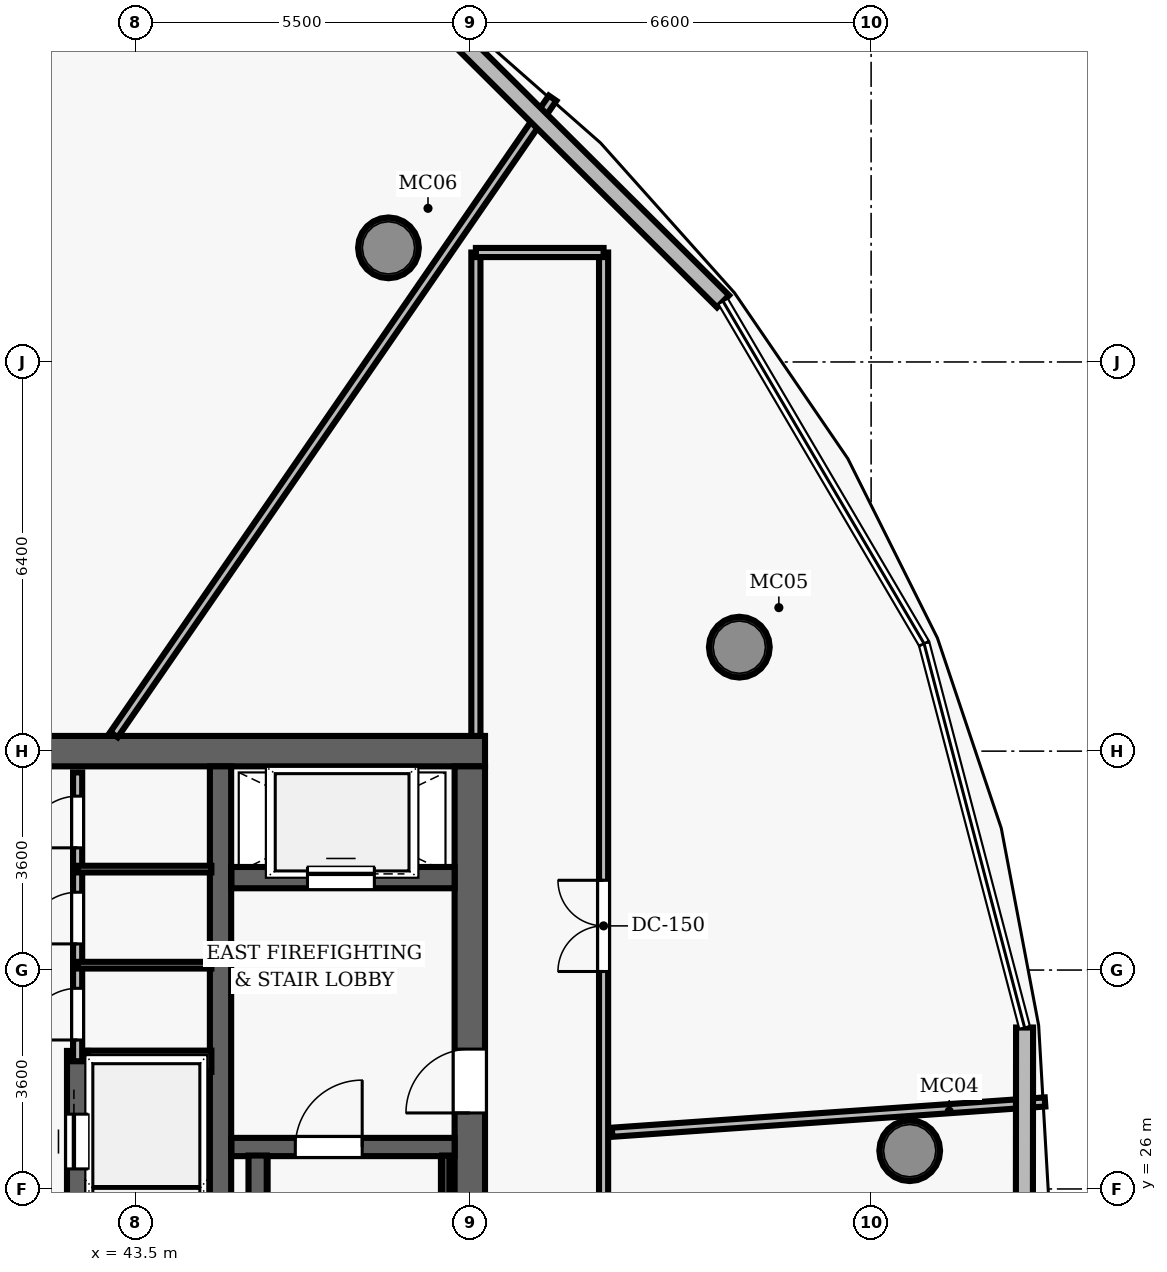
"""IFC4 building model, lengths in metres.
Left out: names, types, materials, properties, quantities, classifications, styles, units other than length and angle.
Written with IfcOpenShell. Run it as: python <this file> out.ifc"""

import sys

from ifc_helpers import new_model, si_unit, direction, frame, frame_2d, origin, origin_2d, place, context, subcontext, project, spatial, rectangle, hollow_circle, extrude, element, fill, save


model = new_model("IFC4")
c1 = context("Model", 3, precision=1e-05, world=origin(), true_north=direction((0.0, 1.0)))
c2 = subcontext(c1, "Body", "Model", "MODEL_VIEW")
j1 = project(units=[si_unit("LENGTHUNIT", "METRE"), si_unit("PLANEANGLEUNIT", "RADIAN")], contexts=[c1])
p1 = place(None, origin())
s1 = spatial("IfcSite", under=j1, at=p1, CompositionType="ELEMENT")
p2 = place(p1, origin())
s2 = spatial("IfcBuilding", under=s1, at=p2, CompositionType="ELEMENT")
p3 = place(p2, frame((0.0, 0.0, 303.65)))
s3 = spatial("IfcBuildingStorey", under=s2, at=p3, CompositionType="ELEMENT", Elevation=303.65)
p4 = place(p3, frame((26.75, 33.2, 0.0), z_axis=(0.0, 0.0, 1.0), x_axis=(1.0, 0.0, 0.0)))
e1 = element("IfcWall", 1, at=p4, inside=s3, PredefinedType="SHEAR", context=c2, shape_type="SweptSolid", body=[
    extrude(rectangle(XDim=22.5, YDim=0.5, at=frame_2d((11.25, 0.0))), origin(), (0.0, 0.0, 1.0), 3.85),
])
p5 = place(p3, frame((49.0, 19.05, 0.0), z_axis=(0.0, 0.0, 1.0), x_axis=(0.0, 1.0, 0.0)))
e2 = element("IfcWall", 2, at=p5, inside=s3, PredefinedType="SHEAR", context=c2, shape_type="SweptSolid", body=[
    extrude(rectangle(XDim=13.9, YDim=0.5, at=frame_2d((6.95, 0.0))), origin(), (0.0, 0.0, 1.0), 3.85),
])
p6 = place(p5, frame((8.2, 0.0, 0.0)))
e3 = element("IfcOpeningElement", 3, at=p6, cuts=e2, PredefinedType="OPENING", context=c2, shape_type="SweptSolid", body=[
    extrude(rectangle(XDim=1.05, YDim=2.15, at=frame_2d((0.525, 1.075))), frame((0.0, 0.26, 0.0), z_axis=(0.0, -1.0, 0.0), x_axis=(1.0, 0.0, 0.0)), (0.0, 0.0, 1.0), 0.52),
])
p7 = place(p3, frame((44.9, 19.05, 0.0), z_axis=(0.0, 0.0, 1.0), x_axis=(0.0, 1.0, 0.0)))
e4 = element("IfcWall", 4, at=p7, inside=s3, PredefinedType="SHEAR", context=c2, shape_type="SweptSolid", body=[
    extrude(rectangle(XDim=13.9, YDim=0.35, at=frame_2d((6.95, 0.0))), origin(), (0.0, 0.0, 1.0), 3.85),
])
for number, where, z_axis, x_axis in (
    (5, (56.235, 26.629, 0.0), (0.0, 0.0, 1.0), (1.0, 0.0, 0.0)),
    (6, (53.433, 34.91, 0.0), (0.0, 0.0, 1.0), (1.0, 0.0, 0.0)),
    (7, (47.662, 41.477, 0.0), (0.0, 0.0, 1.0), (1.0, 0.0, 0.0)),
):
    element("IfcColumn", number, at=place(p3, frame(where, z_axis=z_axis, x_axis=x_axis)), inside=s3, PredefinedType="COLUMN", context=c2, shape_type="SweptSolid", body=[
        extrude(hollow_circle(Radius=0.5, WallThickness=0.045, at=origin_2d()), origin(), (0.0, 0.0, 1.0), 3.85),
    ])
p8 = place(p3, frame((45.08, 26.69, 0.0), z_axis=(0.0, 0.0, 1.0), x_axis=(1.0, 0.0, 0.0)))
e8 = element("IfcWall", 8, at=p8, inside=s3, PredefinedType="SHEAR", context=c2, shape_type="SweptSolid", body=[
    extrude(rectangle(XDim=3.67, YDim=0.3, at=frame_2d((1.835, 0.0))), origin(), (0.0, 0.0, 1.0), 3.85),
])
p9 = place(p8, frame((1.05, 0.0, 0.0)))
e9 = element("IfcOpeningElement", 9, at=p9, cuts=e8, PredefinedType="OPENING", context=c2, shape_type="SweptSolid", body=[
    extrude(rectangle(XDim=1.1, YDim=2.15, at=frame_2d((0.55, 1.075))), frame((0.0, 0.16, 0.0), z_axis=(0.0, -1.0, 0.0), x_axis=(1.0, 0.0, 0.0)), (0.0, 0.0, 1.0), 0.32),
])
p10 = place(p3, frame((45.51, 19.05, 0.0), z_axis=(0.0, 0.0, 1.0), x_axis=(0.0, 1.0, 0.0)))
e10 = element("IfcWall", 10, at=p10, inside=s3, PredefinedType="SHEAR", context=c2, shape_type="SweptSolid", body=[
    extrude(rectangle(XDim=7.5, YDim=0.3, at=frame_2d((3.75, 0.0))), origin(), (0.0, 0.0, 1.0), 3.85),
])
p11 = place(p3, frame((48.605, 19.1, 0.0), z_axis=(0.0, 0.0, 1.0), x_axis=(0.0, 1.0, 0.0)))
e11 = element("IfcWall", 11, at=p11, inside=s3, PredefinedType="SHEAR", context=c2, shape_type="SweptSolid", body=[
    extrude(rectangle(XDim=7.45, YDim=0.12, at=frame_2d((3.725, 0.0))), origin(), (0.0, 0.0, 1.0), 3.85),
])
p12 = place(p3, frame((45.08, 31.12, 0.0), z_axis=(0.0, 0.0, 1.0), x_axis=(1.0, 0.0, 0.0)))
e12 = element("IfcWall", 12, at=p12, inside=s3, PredefinedType="SHEAR", context=c2, shape_type="SweptSolid", body=[
    extrude(rectangle(XDim=3.67, YDim=0.35, at=frame_2d((1.835, 0.0))), origin(), (0.0, 0.0, 1.0), 3.015),
])
p13 = place(p12, frame((1.25, 0.0, 0.0)))
e13 = element("IfcOpeningElement", 13, at=p13, cuts=e12, PredefinedType="OPENING", context=c2, shape_type="SweptSolid", body=[
    extrude(rectangle(XDim=1.1, YDim=2.15, at=frame_2d((0.55, 1.075))), frame((0.0, 0.185, 0.0), z_axis=(0.0, -1.0, 0.0), x_axis=(1.0, 0.0, 0.0)), (0.0, 0.0, 1.0), 0.37),
])
p14 = place(p3, frame((42.55, 21.73, 0.0), z_axis=(0.0, 0.0, 1.0), x_axis=(0.0, 1.0, 0.0)))
e14 = element("IfcWall", 14, at=p14, inside=s3, PredefinedType="SHEAR", context=c2, shape_type="SweptSolid", body=[
    extrude(rectangle(XDim=6.54, YDim=0.35, at=frame_2d((3.27, 0.0))), origin(), (0.0, 0.0, 1.0), 3.015),
])
p15 = place(p14, frame((0.5, 0.0, 0.0)))
e15 = element("IfcOpeningElement", 15, at=p15, cuts=e14, PredefinedType="OPENING", context=c2, shape_type="SweptSolid", body=[
    extrude(rectangle(XDim=0.9, YDim=2.15, at=frame_2d((0.45, 1.075))), frame((0.0, 0.185, 0.0), z_axis=(0.0, -1.0, 0.0), x_axis=(1.0, 0.0, 0.0)), (0.0, 0.0, 1.0), 0.37),
])
p16 = place(p14, frame((2.55, 0.0, 0.0)))
e16 = element("IfcOpeningElement", 16, at=p16, cuts=e14, PredefinedType="OPENING", context=c2, shape_type="SweptSolid", body=[
    extrude(rectangle(XDim=0.9, YDim=2.15, at=frame_2d((0.45, 1.075))), frame((0.0, 0.185, 0.0), z_axis=(0.0, -1.0, 0.0), x_axis=(1.0, 0.0, 0.0)), (0.0, 0.0, 1.0), 0.37),
])
p17 = place(p14, frame((4.6, 0.0, 0.0)))
e17 = element("IfcOpeningElement", 17, at=p17, cuts=e14, PredefinedType="OPENING", context=c2, shape_type="SweptSolid", body=[
    extrude(rectangle(XDim=0.9, YDim=2.15, at=frame_2d((0.45, 1.075))), frame((0.0, 0.185, 0.0), z_axis=(0.0, -1.0, 0.0), x_axis=(1.0, 0.0, 0.0)), (0.0, 0.0, 1.0), 0.37),
])
p18 = place(p3, frame((42.72, 28.1, 0.0), z_axis=(0.0, 0.0, 1.0), x_axis=(1.0, 0.0, 0.0)))
e18 = element("IfcWall", 18, at=p18, inside=s3, PredefinedType="SHEAR", context=c2, shape_type="SweptSolid", body=[
    extrude(rectangle(XDim=2.03, YDim=0.35, at=frame_2d((1.015, 0.0))), origin(), (0.0, 0.0, 1.0), 3.015),
])
p19 = place(p3, frame((42.55, 28.1, 0.0), z_axis=(0.0, 0.0, 1.0), x_axis=(0.0, 1.0, 0.0)))
e19 = element("IfcWall", 19, at=p19, inside=s3, PredefinedType="PARTITIONING", context=c2, shape_type="SweptSolid", body=[
    extrude(rectangle(XDim=4.75, YDim=0.15, at=frame_2d((2.375, 0.0))), origin(), (0.0, 0.0, 1.0), 3.015),
])
p20 = place(p19, frame((0.35, 0.0, 0.0)))
e20 = element("IfcOpeningElement", 20, at=p20, cuts=e19, PredefinedType="OPENING", context=c2, shape_type="SweptSolid", body=[
    extrude(rectangle(XDim=0.85, YDim=2.1, at=frame_2d((0.425, 1.05))), frame((0.0, 0.085, 0.0), z_axis=(0.0, -1.0, 0.0), x_axis=(1.0, 0.0, 0.0)), (0.0, 0.0, 1.0), 0.17),
])
p21 = place(p19, frame((1.93, 0.0, 0.0)))
e21 = element("IfcOpeningElement", 21, at=p21, cuts=e19, PredefinedType="OPENING", context=c2, shape_type="SweptSolid", body=[
    extrude(rectangle(XDim=0.85, YDim=2.1, at=frame_2d((0.425, 1.05))), frame((0.0, 0.085, 0.0), z_axis=(0.0, -1.0, 0.0), x_axis=(1.0, 0.0, 0.0)), (0.0, 0.0, 1.0), 0.17),
])
p22 = place(p19, frame((3.51, 0.0, 0.0)))
e22 = element("IfcOpeningElement", 22, at=p22, cuts=e19, PredefinedType="OPENING", context=c2, shape_type="SweptSolid", body=[
    extrude(rectangle(XDim=0.85, YDim=2.1, at=frame_2d((0.425, 1.05))), frame((0.0, 0.085, 0.0), z_axis=(0.0, -1.0, 0.0), x_axis=(1.0, 0.0, 0.0)), (0.0, 0.0, 1.0), 0.17),
])
for number, where, z_axis, x_axis in (
    (23, (42.55, 29.68, 0.0), (0.0, 0.0, 1.0), (1.0, 0.0, 0.0)),
    (24, (42.55, 31.26, 0.0), (0.0, 0.0, 1.0), (1.0, 0.0, 0.0)),
):
    element("IfcWall", number, at=place(p3, frame(where, z_axis=z_axis, x_axis=x_axis)), inside=s3, PredefinedType="PARTITIONING", context=c2, shape_type="SweptSolid", body=[
        extrude(rectangle(XDim=2.2, YDim=0.11, at=frame_2d((1.1, 0.0))), origin(), (0.0, 0.0, 1.0), 3.015),
    ])
p23 = place(p3, frame((51.2, 10.6, 0.0), z_axis=(0.0, 0.0, 1.0), x_axis=(0.0, 1.0, 0.0)))
e25 = element("IfcWall", 25, at=p23, inside=s3, PredefinedType="PARTITIONING", context=c2, shape_type="SweptSolid", body=[
    extrude(rectangle(XDim=30.8, YDim=0.15, at=frame_2d((15.4, 0.0))), origin(), (0.0, 0.0, 1.0), 3.015),
])
p24 = place(p23, frame((18.976, 0.0, 0.0)))
e26 = element("IfcOpeningElement", 26, at=p24, cuts=e25, PredefinedType="OPENING", context=c2, shape_type="SweptSolid", body=[
    extrude(rectangle(XDim=1.5, YDim=2.2, at=frame_2d((0.75, 1.1))), frame((0.0, 0.085, 0.0), z_axis=(0.0, -1.0, 0.0), x_axis=(1.0, 0.0, 0.0)), (0.0, 0.0, 1.0), 0.17),
])
p25 = place(p23, frame((12.135, 0.0, 0.0)))
e27 = element("IfcOpeningElement", 27, at=p25, cuts=e25, PredefinedType="OPENING", context=c2, shape_type="SweptSolid", body=[
    extrude(rectangle(XDim=0.95, YDim=2.15, at=frame_2d((0.475, 1.075))), frame((0.0, 0.085, 0.0), z_axis=(0.0, -1.0, 0.0), x_axis=(1.0, 0.0, 0.0)), (0.0, 0.0, 1.0), 0.17),
])
p26 = place(p3, frame((49.1, 33.45, 0.0), z_axis=(0.0, 0.0, 1.0), x_axis=(0.0, 1.0, 0.0)))
e28 = element("IfcWall", 28, at=p26, inside=s3, PredefinedType="PARTITIONING", context=c2, shape_type="SweptSolid", body=[
    extrude(rectangle(XDim=7.95, YDim=0.15, at=frame_2d((3.975, 0.0))), origin(), (0.0, 0.0, 1.0), 3.015),
])
p27 = place(p3, frame((49.1, 41.4, 0.0), z_axis=(0.0, 0.0, 1.0), x_axis=(1.0, 0.0, 0.0)))
e29 = element("IfcWall", 29, at=p27, inside=s3, PredefinedType="PARTITIONING", context=c2, shape_type="SweptSolid", body=[
    extrude(rectangle(XDim=2.1, YDim=0.15, at=frame_2d((1.05, 0.0))), origin(), (0.0, 0.0, 1.0), 3.015),
])
p28 = place(p3, frame((51.34, 26.933, 0.0), z_axis=(0.0, 0.0, 1.0), x_axis=(0.997564872664, 0.069744711815, 0.0)))
e30 = element("IfcWall", 30, at=p28, inside=s3, PredefinedType="PARTITIONING", context=c2, shape_type="SweptSolid", body=[
    extrude(rectangle(XDim=7.137, YDim=0.15, at=frame_2d((3.569, 0.0))), origin(), (0.0, 0.0, 1.0), 3.015),
])
p29 = place(p3, frame((43.148, 33.47, 0.0), z_axis=(0.0, 0.0, 1.0), x_axis=(0.567425051225, 0.823425048952, 0.0)))
e31 = element("IfcWall", 31, at=p29, inside=s3, PredefinedType="PARTITIONING", context=c2, shape_type="SweptSolid", body=[
    extrude(rectangle(XDim=12.712, YDim=0.15, at=frame_2d((6.356, 0.0))), origin(), (0.0, 0.0, 1.0), 3.015),
])
p30 = place(p3, frame((58.124, 28.655, 0.0), z_axis=(0.0, 0.0, 1.0), x_axis=(-0.001010062707, -0.999999489887, 0.0)))
e32 = element("IfcWall", 32, at=p30, inside=s3, PredefinedType="SOLIDWALL", context=c2, shape_type="SweptSolid", body=[
    extrude(rectangle(XDim=6.526, YDim=0.28, at=frame_2d((3.263, 0.0))), origin(), (0.0, 0.0, 1.0), 3.6),
])
p31 = place(p3, frame((48.538, 45.199, 0.0), z_axis=(0.0, 0.0, 1.0), x_axis=(0.709049371212, -0.705158839683, 0.0)))
e33 = element("IfcWall", 33, at=p31, inside=s3, PredefinedType="SOLIDWALL", context=c2, shape_type="SweptSolid", body=[
    extrude(rectangle(XDim=6.526, YDim=0.28, at=frame_2d((3.263, 0.0))), origin(), (0.0, 0.0, 1.0), 3.6),
])
p32 = place(p9, origin())
e34 = element("IfcDoor", 34, at=p32, inside=s3, OperationType="SINGLE_SWING_RIGHT", PredefinedType="DOOR", context=c2, shape_type="SweptSolid", body=[
    extrude(rectangle(XDim=1.1, YDim=2.15, at=frame_2d((0.55, 1.075))), frame((0.0, 0.025, 0.0), z_axis=(0.0, -1.0, 0.0), x_axis=(1.0, 0.0, 0.0)), (0.0, 0.0, 1.0), 0.05),
])
fill(e9, e34)
p33 = place(p6, origin())
e35 = element("IfcDoor", 35, at=p33, inside=s3, OperationType="SINGLE_SWING_LEFT", PredefinedType="DOOR", context=c2, shape_type="SweptSolid", body=[
    extrude(rectangle(XDim=1.05, YDim=2.15, at=frame_2d((0.525, 1.075))), frame((0.0, 0.025, 0.0), z_axis=(0.0, -1.0, 0.0), x_axis=(1.0, 0.0, 0.0)), (0.0, 0.0, 1.0), 0.05),
])
fill(e3, e35)
p34 = place(p20, origin())
e36 = element("IfcDoor", 36, at=p34, inside=s3, OperationType="SINGLE_SWING_LEFT", PredefinedType="DOOR", context=c2, shape_type="SweptSolid", body=[
    extrude(rectangle(XDim=0.85, YDim=2.1, at=frame_2d((0.425, 1.05))), frame((0.0, 0.025, 0.0), z_axis=(0.0, -1.0, 0.0), x_axis=(1.0, 0.0, 0.0)), (0.0, 0.0, 1.0), 0.05),
])
fill(e20, e36)
p35 = place(p21, origin())
e37 = element("IfcDoor", 37, at=p35, inside=s3, OperationType="SINGLE_SWING_LEFT", PredefinedType="DOOR", context=c2, shape_type="SweptSolid", body=[
    extrude(rectangle(XDim=0.85, YDim=2.1, at=frame_2d((0.425, 1.05))), frame((0.0, 0.025, 0.0), z_axis=(0.0, -1.0, 0.0), x_axis=(1.0, 0.0, 0.0)), (0.0, 0.0, 1.0), 0.05),
])
fill(e21, e37)
p36 = place(p22, origin())
e38 = element("IfcDoor", 38, at=p36, inside=s3, OperationType="SINGLE_SWING_LEFT", PredefinedType="DOOR", context=c2, shape_type="SweptSolid", body=[
    extrude(rectangle(XDim=0.85, YDim=2.1, at=frame_2d((0.425, 1.05))), frame((0.0, 0.025, 0.0), z_axis=(0.0, -1.0, 0.0), x_axis=(1.0, 0.0, 0.0)), (0.0, 0.0, 1.0), 0.05),
])
fill(e22, e38)
p37 = place(p24, origin())
e39 = element("IfcDoor", 39, at=p37, inside=s3, OperationType="DOUBLE_DOOR_SINGLE_SWING", PredefinedType="DOOR", context=c2, shape_type="SweptSolid", body=[
    extrude(rectangle(XDim=1.5, YDim=2.2, at=frame_2d((0.75, 1.1))), frame((0.0, 0.025, 0.0), z_axis=(0.0, -1.0, 0.0), x_axis=(1.0, 0.0, 0.0)), (0.0, 0.0, 1.0), 0.05),
])
fill(e26, e39)
p38 = place(p17, origin())
e40 = element("IfcDoor", 40, at=p38, inside=s3, OperationType="SLIDING_TO_LEFT", PredefinedType="DOOR", context=c2, shape_type="SweptSolid", body=[
    extrude(rectangle(XDim=0.9, YDim=2.15, at=frame_2d((0.45, 1.075))), frame((0.0, 0.025, 0.0), z_axis=(0.0, -1.0, 0.0), x_axis=(1.0, 0.0, 0.0)), (0.0, 0.0, 1.0), 0.05),
])
fill(e17, e40)
p39 = place(p13, origin())
e41 = element("IfcDoor", 41, at=p39, inside=s3, OperationType="SLIDING_TO_LEFT", PredefinedType="DOOR", context=c2, shape_type="SweptSolid", body=[
    extrude(rectangle(XDim=1.1, YDim=2.15, at=frame_2d((0.55, 1.075))), frame((0.0, 0.025, 0.0), z_axis=(0.0, -1.0, 0.0), x_axis=(1.0, 0.0, 0.0)), (0.0, 0.0, 1.0), 0.05),
])
fill(e13, e41)
save(model, sys.argv[1])
